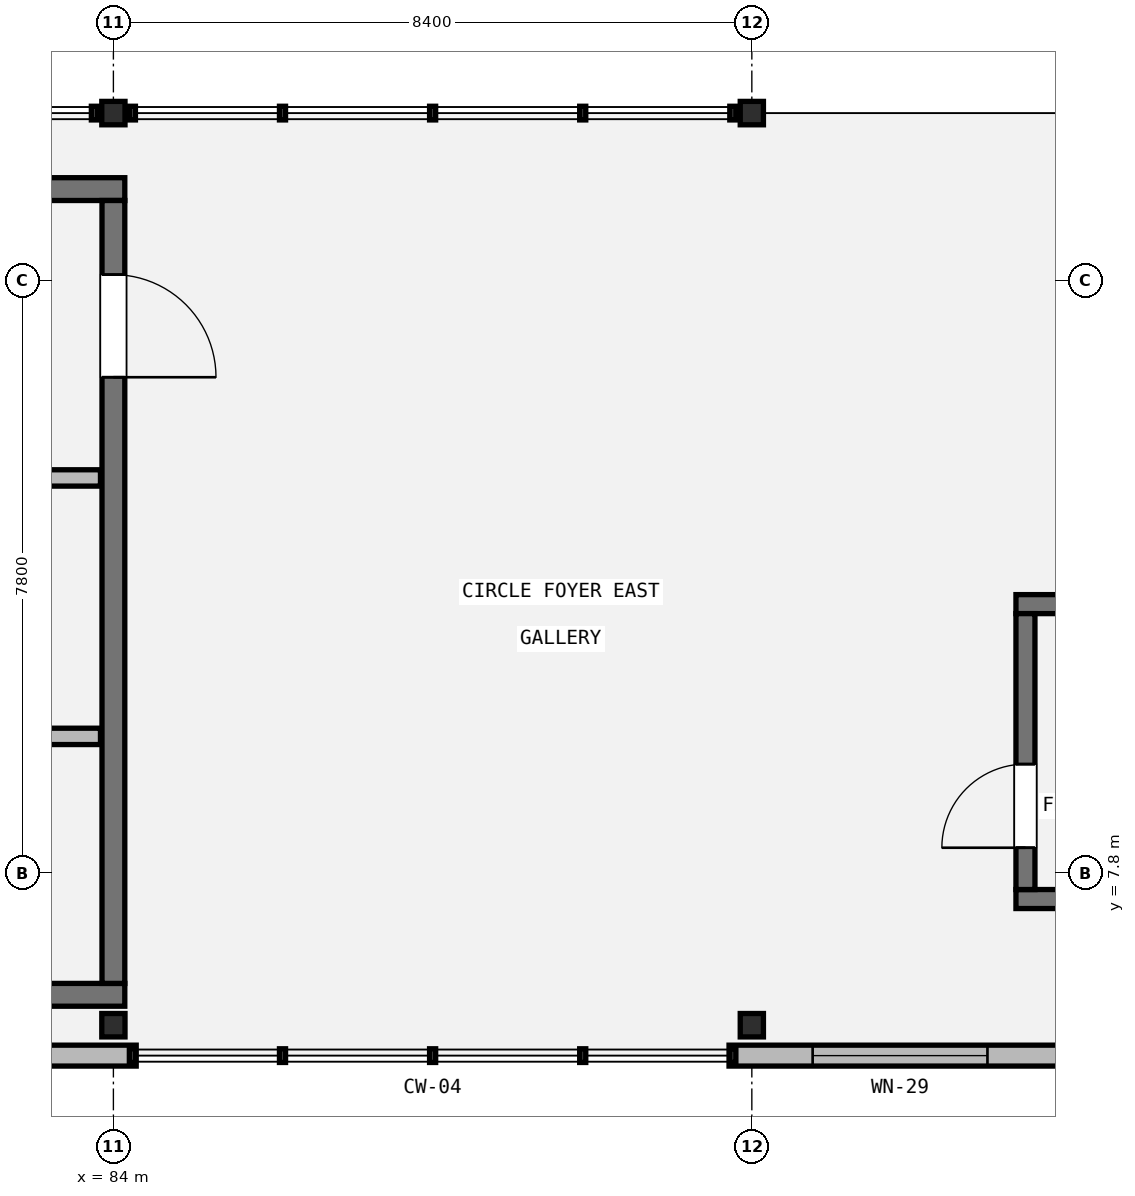
"""IFC4 building model, lengths in metres.
Left out: names, types, materials, properties, quantities, classifications, styles, units other than length and angle.
Written with IfcOpenShell. Run it as: python <this file> out.ifc"""

import sys

from ifc_helpers import new_model, si_unit, direction, frame, frame_2d, origin, origin_2d, place, context, subcontext, project, spatial, rectangle, i_section, extrude, element, fill, save


model = new_model("IFC4")
c1 = context("Model", 3, precision=1e-05, world=origin(), true_north=direction((0.0, 1.0)))
c2 = subcontext(c1, "Body", "Model", "MODEL_VIEW")
j1 = project(units=[si_unit("LENGTHUNIT", "METRE"), si_unit("PLANEANGLEUNIT", "RADIAN")], contexts=[c1])
p1 = place(None, origin())
s1 = spatial("IfcSite", under=j1, at=p1, CompositionType="ELEMENT")
p2 = place(p1, origin())
s2 = spatial("IfcBuilding", under=s1, at=p2, CompositionType="ELEMENT")
p3 = place(p2, frame((0.0, 0.0, 5.4)))
s3 = spatial("IfcBuildingStorey", under=s2, at=p3, CompositionType="ELEMENT", Elevation=5.4)
for number, where, z_axis, x_axis in (
    (1, (84.0, 5.8, 0.0), (0.0, 0.0, 1.0), (1.0, 0.0, 0.0)),
    (2, (84.0, 17.8, 0.0), (0.0, 0.0, 1.0), (1.0, 0.0, 0.0)),
    (3, (92.4, 5.8, 0.0), (0.0, 0.0, 1.0), (1.0, 0.0, 0.0)),
    (4, (92.4, 17.8, 0.0), (0.0, 0.0, 1.0), (1.0, 0.0, 0.0)),
):
    element("IfcColumn", number, at=place(p3, frame(where, z_axis=z_axis, x_axis=x_axis)), inside=s3, PredefinedType="COLUMN", context=c2, shape_type="SweptSolid", body=[
        extrude(i_section(OverallWidth=0.305, OverallDepth=0.308, WebThickness=0.01, FlangeThickness=0.015, FilletRadius=0.015, at=origin_2d()), origin(), (0.0, 0.0, 1.0), 4.8),
    ])
p4 = place(p3, frame((84.3, 5.4, 0.0), z_axis=(0.0, 0.0, 1.0), x_axis=(-1.0, 0.0, 0.0)))
e5 = element("IfcWall", 5, at=p4, inside=s3, PredefinedType="STANDARD", context=c2, shape_type="SweptSolid", body=[
    extrude(rectangle(XDim=9.0, YDim=0.275, at=frame_2d((4.5, 0.0))), origin(), (0.0, 0.0, 1.0), 4.013),
])
p5 = place(p3, frame((101.1, 5.4, 0.0), z_axis=(0.0, 0.0, 1.0), x_axis=(-1.0, 0.0, 0.0)))
e6 = element("IfcWall", 6, at=p5, inside=s3, PredefinedType="STANDARD", context=c2, shape_type="SweptSolid", body=[
    extrude(rectangle(XDim=9.0, YDim=0.275, at=frame_2d((4.5, 0.0))), origin(), (0.0, 0.0, 1.0), 4.013),
])
p6 = place(p5, frame((1.2, 0.0, 0.9)))
e7 = element("IfcOpeningElement", 7, at=p6, cuts=e6, PredefinedType="OPENING", context=c2, shape_type="SweptSolid", body=[
    extrude(rectangle(XDim=2.1, YDim=1.95, at=frame_2d((1.05, 0.975))), frame((0.0, 0.147, 0.0), z_axis=(0.0, -1.0, 0.0), x_axis=(1.0, 0.0, 0.0)), (0.0, 0.0, 1.0), 0.295),
])
p7 = place(p5, frame((5.6, 0.0, 0.9)))
e8 = element("IfcOpeningElement", 8, at=p7, cuts=e6, PredefinedType="OPENING", context=c2, shape_type="SweptSolid", body=[
    extrude(rectangle(XDim=2.3, YDim=1.95, at=frame_2d((1.15, 0.975))), frame((0.0, 0.147, 0.0), z_axis=(0.0, -1.0, 0.0), x_axis=(1.0, 0.0, 0.0)), (0.0, 0.0, 1.0), 0.295),
])
for number, where, z_axis, x_axis in (
    (9, (106.285, 7.46, 0.0), (0.0, 0.0, 1.0), (-1.0, 0.0, 0.0)),
    (10, (95.875, 11.34, 0.0), (0.0, 0.0, 1.0), (1.0, 0.0, 0.0)),
):
    element("IfcWall", number, at=place(p3, frame(where, z_axis=z_axis, x_axis=x_axis)), inside=s3, PredefinedType="SHEAR", context=c2, shape_type="SweptSolid", body=[
        extrude(rectangle(XDim=10.41, YDim=0.25, at=frame_2d((5.205, 0.0))), origin(), (0.0, 0.0, 1.0), 4.58),
    ])
p8 = place(p3, frame((96.0, 7.585, 0.0), z_axis=(0.0, 0.0, 1.0), x_axis=(0.0, 1.0, 0.0)))
e11 = element("IfcWall", 11, at=p8, inside=s3, PredefinedType="SHEAR", context=c2, shape_type="SweptSolid", body=[
    extrude(rectangle(XDim=3.63, YDim=0.25, at=frame_2d((1.815, 0.0))), origin(), (0.0, 0.0, 1.0), 4.58),
])
p9 = place(p8, frame((0.55, 0.0, 0.0)))
e12 = element("IfcOpeningElement", 12, at=p9, cuts=e11, PredefinedType="OPENING", context=c2, shape_type="SweptSolid", body=[
    extrude(rectangle(XDim=1.1, YDim=2.15, at=frame_2d((0.55, 1.075))), frame((0.0, 0.135, 0.0), z_axis=(0.0, -1.0, 0.0), x_axis=(1.0, 0.0, 0.0)), (0.0, 0.0, 1.0), 0.27),
])
for number, where, z_axis, x_axis in (
    (13, (84.15, 6.2, 0.0), (0.0, 0.0, 1.0), (-1.0, 0.0, 0.0)),
    (14, (75.65, 16.8, 0.0), (0.0, 0.0, 1.0), (1.0, 0.0, 0.0)),
):
    element("IfcWall", number, at=place(p3, frame(where, z_axis=z_axis, x_axis=x_axis)), inside=s3, PredefinedType="SHEAR", context=c2, shape_type="SweptSolid", body=[
        extrude(rectangle(XDim=8.5, YDim=0.3, at=frame_2d((4.25, 0.0))), origin(), (0.0, 0.0, 1.0), 4.58),
    ])
p10 = place(p3, frame((84.0, 16.65, 0.0), z_axis=(0.0, 0.0, 1.0), x_axis=(0.0, -1.0, 0.0)))
e15 = element("IfcWall", 15, at=p10, inside=s3, PredefinedType="SHEAR", context=c2, shape_type="SweptSolid", body=[
    extrude(rectangle(XDim=10.3, YDim=0.3, at=frame_2d((5.15, 0.0))), origin(), (0.0, 0.0, 1.0), 4.58),
])
p11 = place(p10, frame((0.975, 0.0, 0.0)))
e16 = element("IfcOpeningElement", 16, at=p11, cuts=e15, PredefinedType="OPENING", context=c2, shape_type="SweptSolid", body=[
    extrude(rectangle(XDim=1.35, YDim=2.15, at=frame_2d((0.675, 1.075))), frame((0.0, 0.16, 0.0), z_axis=(0.0, -1.0, 0.0), x_axis=(1.0, 0.0, 0.0)), (0.0, 0.0, 1.0), 0.32),
])
p12 = place(p3, frame((79.98, 9.6, 0.0), z_axis=(0.0, 0.0, 1.0), x_axis=(1.0, 0.0, 0.0)))
e17 = element("IfcWall", 17, at=p12, inside=s3, PredefinedType="STANDARD", context=c2, shape_type="SweptSolid", body=[
    extrude(rectangle(XDim=3.85, YDim=0.215, at=frame_2d((1.925, 0.0))), origin(), (0.0, 0.0, 1.0), 3.955),
])
p13 = place(p12, frame((1.4, 0.0, 0.0)))
e18 = element("IfcOpeningElement", 18, at=p13, cuts=e17, PredefinedType="OPENING", context=c2, shape_type="SweptSolid", body=[
    extrude(rectangle(XDim=1.05, YDim=2.15, at=frame_2d((0.525, 1.075))), frame((0.0, 0.117, 0.0), z_axis=(0.0, -1.0, 0.0), x_axis=(1.0, 0.0, 0.0)), (0.0, 0.0, 1.0), 0.235),
])
p14 = place(p3, frame((79.98, 13.0, 0.0), z_axis=(0.0, 0.0, 1.0), x_axis=(1.0, 0.0, 0.0)))
e19 = element("IfcWall", 19, at=p14, inside=s3, PredefinedType="STANDARD", context=c2, shape_type="SweptSolid", body=[
    extrude(rectangle(XDim=3.85, YDim=0.215, at=frame_2d((1.925, 0.0))), origin(), (0.0, 0.0, 1.0), 3.955),
])
p15 = place(p14, frame((1.4, 0.0, 0.0)))
e20 = element("IfcOpeningElement", 20, at=p15, cuts=e19, PredefinedType="OPENING", context=c2, shape_type="SweptSolid", body=[
    extrude(rectangle(XDim=1.05, YDim=2.15, at=frame_2d((0.525, 1.075))), frame((0.0, 0.117, 0.0), z_axis=(0.0, -1.0, 0.0), x_axis=(1.0, 0.0, 0.0)), (0.0, 0.0, 1.0), 0.235),
])
p16 = place(p7, origin())
e21 = element("IfcWindow", 21, at=p16, inside=s3, PartitioningType="SINGLE_PANEL", PredefinedType="WINDOW", context=c2, shape_type="SweptSolid", body=[
    extrude(rectangle(XDim=2.3, YDim=1.95, at=frame_2d((1.15, 0.975))), frame((0.0, 0.03, 0.0), z_axis=(0.0, -1.0, 0.0), x_axis=(1.0, 0.0, 0.0)), (0.0, 0.0, 1.0), 0.06),
])
fill(e8, e21)
p17 = place(p9, origin())
e22 = element("IfcDoor", 22, at=p17, inside=s3, OperationType="SINGLE_SWING_LEFT", PredefinedType="DOOR", context=c2, shape_type="SweptSolid", body=[
    extrude(rectangle(XDim=1.1, YDim=2.15, at=frame_2d((0.55, 1.075))), frame((0.0, 0.025, 0.0), z_axis=(0.0, -1.0, 0.0), x_axis=(1.0, 0.0, 0.0)), (0.0, 0.0, 1.0), 0.05),
])
fill(e12, e22)
p18 = place(p11, origin())
e23 = element("IfcDoor", 23, at=p18, inside=s3, OperationType="SINGLE_SWING_RIGHT", PredefinedType="DOOR", context=c2, shape_type="SweptSolid", body=[
    extrude(rectangle(XDim=1.35, YDim=2.15, at=frame_2d((0.675, 1.075))), frame((0.0, 0.025, 0.0), z_axis=(0.0, -1.0, 0.0), x_axis=(1.0, 0.0, 0.0)), (0.0, 0.0, 1.0), 0.05),
])
fill(e16, e23)
save(model, sys.argv[1])
